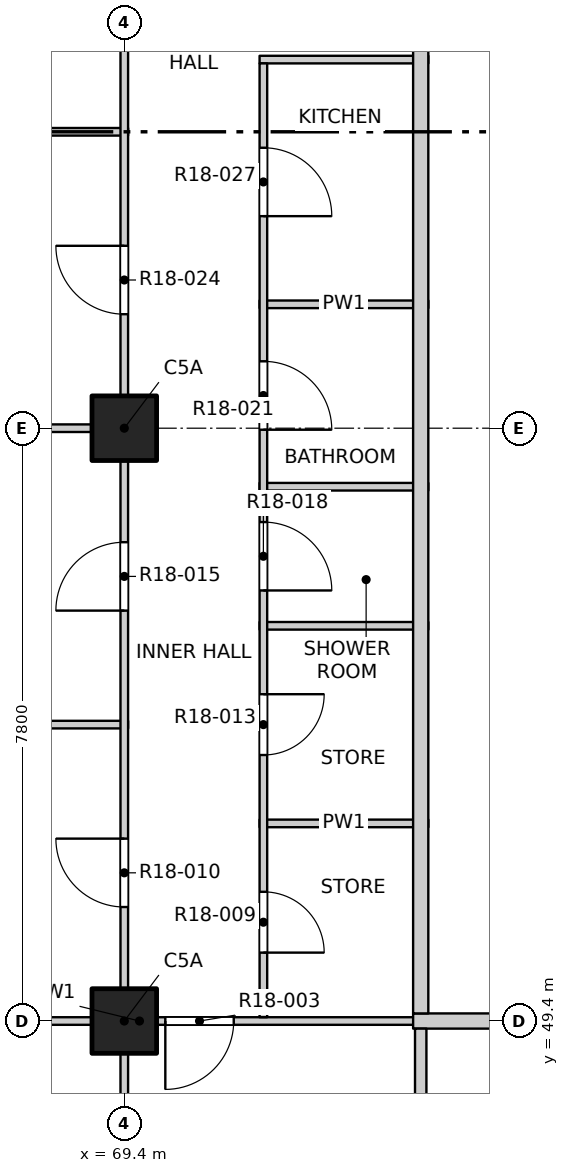
"""IFC4 building model, lengths in metres.
Left out: names, types, materials, properties, quantities, classifications, styles, units other than length and angle.
Written with IfcOpenShell. Run it as: python <this file> out.ifc"""

import sys

from ifc_helpers import new_model, si_unit, direction, frame, frame_2d, origin, origin_2d, place, context, subcontext, project, spatial, rectangle, extrude, element, fill, save


model = new_model("IFC4")
c1 = context("Model", 3, precision=1e-05, world=origin(), true_north=direction((0.0, 1.0)))
c2 = subcontext(c1, "Body", "Model", "MODEL_VIEW")
j1 = project(units=[si_unit("LENGTHUNIT", "METRE"), si_unit("PLANEANGLEUNIT", "RADIAN")], contexts=[c1])
p1 = place(None, origin())
s1 = spatial("IfcSite", under=j1, at=p1, CompositionType="ELEMENT")
p2 = place(p1, origin())
s2 = spatial("IfcBuilding", under=s1, at=p2, CompositionType="ELEMENT")
p3 = place(p2, frame((0.0, 0.0, 189.4)))
s3 = spatial("IfcBuildingStorey", under=s2, at=p3, CompositionType="ELEMENT", Elevation=189.4)
for number, where, z_axis, x_axis in (
    (1, (69.4, 49.4, -0.25), (0.0, 0.0, 1.0), (1.0, 0.0, 0.0)),
    (2, (69.4, 57.2, -0.25), (0.0, 0.0, 1.0), (1.0, 0.0, 0.0)),
):
    element("IfcColumn", number, at=place(p3, frame(where, z_axis=z_axis, x_axis=x_axis)), inside=s3, PredefinedType="COLUMN", context=c2, shape_type="SweptSolid", body=[
        extrude(rectangle(XDim=0.85, YDim=0.85, at=origin_2d()), origin(), (0.0, 0.0, 1.0), 3.35),
    ])
p4 = place(p3, frame((65.8, 49.4, 0.0), z_axis=(0.0, 0.0, 1.0), x_axis=(1.0, 0.0, 0.0)))
e3 = element("IfcWall", 3, at=p4, inside=s3, PredefinedType="PARTITIONING", context=c2, shape_type="SweptSolid", body=[
    extrude(rectangle(XDim=7.6, YDim=0.1, at=frame_2d((3.8, 0.0))), origin(), (0.0, 0.0, 1.0), 3.1),
])
p5 = place(p4, frame((4.14, 0.0, 0.0)))
e4 = element("IfcOpeningElement", 4, at=p5, cuts=e3, PredefinedType="OPENING", context=c2, shape_type="SweptSolid", body=[
    extrude(rectangle(XDim=0.9, YDim=2.1, at=frame_2d((0.45, 1.05))), frame((0.0, 0.06, 0.0), z_axis=(0.0, -1.0, 0.0), x_axis=(1.0, 0.0, 0.0)), (0.0, 0.0, 1.0), 0.12),
])
p6 = place(p3, frame((73.2, 49.4, 0.0), z_axis=(0.0, 0.0, 1.0), x_axis=(1.0, 0.0, 0.0)))
e5 = element("IfcWall", 5, at=p6, inside=s3, PredefinedType="PARTITIONING", context=c2, shape_type="SweptSolid", body=[
    extrude(rectangle(XDim=23.6, YDim=0.2, at=frame_2d((11.8, 0.0))), origin(), (0.0, 0.0, 1.0), 3.1),
])
p7 = place(p6, frame((4.525, 0.0, 0.0)))
e6 = element("IfcOpeningElement", 6, at=p7, cuts=e5, PredefinedType="OPENING", context=c2, shape_type="SweptSolid", body=[
    extrude(rectangle(XDim=1.2, YDim=2.1, at=frame_2d((0.6, 1.05))), frame((0.0, 0.11, 0.0), z_axis=(0.0, -1.0, 0.0), x_axis=(1.0, 0.0, 0.0)), (0.0, 0.0, 1.0), 0.22),
])
p8 = place(p6, frame((12.325, 0.0, 0.0)))
e7 = element("IfcOpeningElement", 7, at=p8, cuts=e5, PredefinedType="OPENING", context=c2, shape_type="SweptSolid", body=[
    extrude(rectangle(XDim=1.2, YDim=2.1, at=frame_2d((0.6, 1.05))), frame((0.0, 0.11, 0.0), z_axis=(0.0, -1.0, 0.0), x_axis=(1.0, 0.0, 0.0)), (0.0, 0.0, 1.0), 0.22),
])
p9 = place(p6, frame((20.125, 0.0, 0.0)))
e8 = element("IfcOpeningElement", 8, at=p9, cuts=e5, PredefinedType="OPENING", context=c2, shape_type="SweptSolid", body=[
    extrude(rectangle(XDim=1.2, YDim=2.1, at=frame_2d((0.6, 1.05))), frame((0.0, 0.11, 0.0), z_axis=(0.0, -1.0, 0.0), x_axis=(1.0, 0.0, 0.0)), (0.0, 0.0, 1.0), 0.22),
])
p10 = place(p3, frame((71.18, 52.0, 0.0), z_axis=(0.0, 0.0, 1.0), x_axis=(1.0, 0.0, 0.0)))
e9 = element("IfcWall", 9, at=p10, inside=s3, PredefinedType="PARTITIONING", context=c2, shape_type="SweptSolid", body=[
    extrude(rectangle(XDim=2.22, YDim=0.1, at=frame_2d((1.11, 0.0))), origin(), (0.0, 0.0, 1.0), 3.1),
])
p11 = place(p3, frame((65.8, 53.3, 0.0), z_axis=(0.0, 0.0, 1.0), x_axis=(1.0, 0.0, 0.0)))
e10 = element("IfcWall", 10, at=p11, inside=s3, PredefinedType="PARTITIONING", context=c2, shape_type="SweptSolid", body=[
    extrude(rectangle(XDim=3.65, YDim=0.1, at=frame_2d((1.825, 0.0))), origin(), (0.0, 0.0, 1.0), 3.1),
])
for number, where, z_axis, x_axis in (
    (11, (71.18, 54.6, 0.0), (0.0, 0.0, 1.0), (1.0, 0.0, 0.0)),
    (12, (71.18, 56.43, 0.0), (0.0, 0.0, 1.0), (1.0, 0.0, 0.0)),
):
    element("IfcWall", number, at=place(p3, frame(where, z_axis=z_axis, x_axis=x_axis)), inside=s3, PredefinedType="PARTITIONING", context=c2, shape_type="SweptSolid", body=[
        extrude(rectangle(XDim=2.22, YDim=0.1, at=frame_2d((1.11, 0.0))), origin(), (0.0, 0.0, 1.0), 3.1),
    ])
p12 = place(p3, frame((65.8, 57.2, 0.0), z_axis=(0.0, 0.0, 1.0), x_axis=(1.0, 0.0, 0.0)))
e13 = element("IfcWall", 13, at=p12, inside=s3, PredefinedType="PARTITIONING", context=c2, shape_type="SweptSolid", body=[
    extrude(rectangle(XDim=3.65, YDim=0.1, at=frame_2d((1.825, 0.0))), origin(), (0.0, 0.0, 1.0), 3.1),
])
p13 = place(p3, frame((71.18, 58.83, 0.0), z_axis=(0.0, 0.0, 1.0), x_axis=(1.0, 0.0, 0.0)))
e14 = element("IfcWall", 14, at=p13, inside=s3, PredefinedType="PARTITIONING", context=c2, shape_type="SweptSolid", body=[
    extrude(rectangle(XDim=2.22, YDim=0.1, at=frame_2d((1.11, 0.0))), origin(), (0.0, 0.0, 1.0), 3.1),
])
p14 = place(p3, frame((65.8, 61.1, 0.0), z_axis=(0.0, 0.0, 1.0), x_axis=(1.0, 0.0, 0.0)))
e15 = element("IfcWall", 15, at=p14, inside=s3, PredefinedType="PARTITIONING", context=c2, shape_type="SweptSolid", body=[
    extrude(rectangle(XDim=3.65, YDim=0.1, at=frame_2d((1.825, 0.0))), origin(), (0.0, 0.0, 1.0), 3.1),
])
p15 = place(p3, frame((71.18, 62.05, 0.0), z_axis=(0.0, 0.0, 1.0), x_axis=(1.0, 0.0, 0.0)))
e16 = element("IfcWall", 16, at=p15, inside=s3, PredefinedType="PARTITIONING", context=c2, shape_type="SweptSolid", body=[
    extrude(rectangle(XDim=2.22, YDim=0.1, at=frame_2d((1.11, 0.0))), origin(), (0.0, 0.0, 1.0), 3.1),
])
p16 = place(p3, frame((69.4, 45.8, 0.0), z_axis=(0.0, 0.0, 1.0), x_axis=(0.0, 1.0, 0.0)))
e17 = element("IfcWall", 17, at=p16, inside=s3, PredefinedType="PARTITIONING", context=c2, shape_type="SweptSolid", body=[
    extrude(rectangle(XDim=38.4, YDim=0.1, at=frame_2d((19.2, 0.0))), origin(), (0.0, 0.0, 1.0), 3.1),
])
p17 = place(p16, frame((1.05, 0.0, 0.0)))
e18 = element("IfcOpeningElement", 18, at=p17, cuts=e17, PredefinedType="OPENING", context=c2, shape_type="SweptSolid", body=[
    extrude(rectangle(XDim=1.2, YDim=2.1, at=frame_2d((0.6, 1.05))), frame((0.0, 0.06, 0.0), z_axis=(0.0, -1.0, 0.0), x_axis=(1.0, 0.0, 0.0)), (0.0, 0.0, 1.0), 0.12),
])
p18 = place(p16, frame((5.1, 0.0, 0.0)))
e19 = element("IfcOpeningElement", 19, at=p18, cuts=e17, PredefinedType="OPENING", context=c2, shape_type="SweptSolid", body=[
    extrude(rectangle(XDim=0.9, YDim=2.1, at=frame_2d((0.45, 1.05))), frame((0.0, 0.06, 0.0), z_axis=(0.0, -1.0, 0.0), x_axis=(1.0, 0.0, 0.0)), (0.0, 0.0, 1.0), 0.12),
])
p19 = place(p16, frame((9.0, 0.0, 0.0)))
e20 = element("IfcOpeningElement", 20, at=p19, cuts=e17, PredefinedType="OPENING", context=c2, shape_type="SweptSolid", body=[
    extrude(rectangle(XDim=0.9, YDim=2.1, at=frame_2d((0.45, 1.05))), frame((0.0, 0.06, 0.0), z_axis=(0.0, -1.0, 0.0), x_axis=(1.0, 0.0, 0.0)), (0.0, 0.0, 1.0), 0.12),
])
p20 = place(p16, frame((12.9, 0.0, 0.0)))
e21 = element("IfcOpeningElement", 21, at=p20, cuts=e17, PredefinedType="OPENING", context=c2, shape_type="SweptSolid", body=[
    extrude(rectangle(XDim=0.9, YDim=2.1, at=frame_2d((0.45, 1.05))), frame((0.0, 0.06, 0.0), z_axis=(0.0, -1.0, 0.0), x_axis=(1.0, 0.0, 0.0)), (0.0, 0.0, 1.0), 0.12),
])
p21 = place(p16, frame((16.8, 0.0, 0.0)))
e22 = element("IfcOpeningElement", 22, at=p21, cuts=e17, PredefinedType="OPENING", context=c2, shape_type="SweptSolid", body=[
    extrude(rectangle(XDim=0.9, YDim=2.1, at=frame_2d((0.45, 1.05))), frame((0.0, 0.06, 0.0), z_axis=(0.0, -1.0, 0.0), x_axis=(1.0, 0.0, 0.0)), (0.0, 0.0, 1.0), 0.12),
])
p22 = place(p16, frame((20.7, 0.0, 0.0)))
e23 = element("IfcOpeningElement", 23, at=p22, cuts=e17, PredefinedType="OPENING", context=c2, shape_type="SweptSolid", body=[
    extrude(rectangle(XDim=0.9, YDim=2.1, at=frame_2d((0.45, 1.05))), frame((0.0, 0.06, 0.0), z_axis=(0.0, -1.0, 0.0), x_axis=(1.0, 0.0, 0.0)), (0.0, 0.0, 1.0), 0.12),
])
p23 = place(p16, frame((24.6, 0.0, 0.0)))
e24 = element("IfcOpeningElement", 24, at=p23, cuts=e17, PredefinedType="OPENING", context=c2, shape_type="SweptSolid", body=[
    extrude(rectangle(XDim=0.9, YDim=2.1, at=frame_2d((0.45, 1.05))), frame((0.0, 0.06, 0.0), z_axis=(0.0, -1.0, 0.0), x_axis=(1.0, 0.0, 0.0)), (0.0, 0.0, 1.0), 0.12),
])
p24 = place(p16, frame((28.5, 0.0, 0.0)))
e25 = element("IfcOpeningElement", 25, at=p24, cuts=e17, PredefinedType="OPENING", context=c2, shape_type="SweptSolid", body=[
    extrude(rectangle(XDim=0.9, YDim=2.1, at=frame_2d((0.45, 1.05))), frame((0.0, 0.06, 0.0), z_axis=(0.0, -1.0, 0.0), x_axis=(1.0, 0.0, 0.0)), (0.0, 0.0, 1.0), 0.12),
])
p25 = place(p16, frame((32.4, 0.0, 0.0)))
e26 = element("IfcOpeningElement", 26, at=p25, cuts=e17, PredefinedType="OPENING", context=c2, shape_type="SweptSolid", body=[
    extrude(rectangle(XDim=0.9, YDim=2.1, at=frame_2d((0.45, 1.05))), frame((0.0, 0.06, 0.0), z_axis=(0.0, -1.0, 0.0), x_axis=(1.0, 0.0, 0.0)), (0.0, 0.0, 1.0), 0.12),
])
p26 = place(p16, frame((36.15, 0.0, 0.0)))
e27 = element("IfcOpeningElement", 27, at=p26, cuts=e17, PredefinedType="OPENING", context=c2, shape_type="SweptSolid", body=[
    extrude(rectangle(XDim=1.2, YDim=2.1, at=frame_2d((0.6, 1.05))), frame((0.0, 0.06, 0.0), z_axis=(0.0, -1.0, 0.0), x_axis=(1.0, 0.0, 0.0)), (0.0, 0.0, 1.0), 0.12),
])
p27 = place(p3, frame((71.23, 49.45, 0.0), z_axis=(0.0, 0.0, 1.0), x_axis=(0.0, 1.0, 0.0)))
e28 = element("IfcWall", 28, at=p27, inside=s3, PredefinedType="PARTITIONING", context=c2, shape_type="SweptSolid", body=[
    extrude(rectangle(XDim=12.55, YDim=0.1, at=frame_2d((6.275, 0.0))), origin(), (0.0, 0.0, 1.0), 3.1),
])
p28 = place(p27, frame((0.85, 0.0, 0.0)))
e29 = element("IfcOpeningElement", 29, at=p28, cuts=e28, PredefinedType="OPENING", context=c2, shape_type="SweptSolid", body=[
    extrude(rectangle(XDim=0.8, YDim=2.1, at=frame_2d((0.4, 1.05))), frame((0.0, 0.06, 0.0), z_axis=(0.0, -1.0, 0.0), x_axis=(1.0, 0.0, 0.0)), (0.0, 0.0, 1.0), 0.12),
])
p29 = place(p27, frame((3.45, 0.0, 0.0)))
e30 = element("IfcOpeningElement", 30, at=p29, cuts=e28, PredefinedType="OPENING", context=c2, shape_type="SweptSolid", body=[
    extrude(rectangle(XDim=0.8, YDim=2.1, at=frame_2d((0.4, 1.05))), frame((0.0, 0.06, 0.0), z_axis=(0.0, -1.0, 0.0), x_axis=(1.0, 0.0, 0.0)), (0.0, 0.0, 1.0), 0.12),
])
p30 = place(p27, frame((5.615, 0.0, 0.0)))
e31 = element("IfcOpeningElement", 31, at=p30, cuts=e28, PredefinedType="OPENING", context=c2, shape_type="SweptSolid", body=[
    extrude(rectangle(XDim=0.9, YDim=2.1, at=frame_2d((0.45, 1.05))), frame((0.0, 0.06, 0.0), z_axis=(0.0, -1.0, 0.0), x_axis=(1.0, 0.0, 0.0)), (0.0, 0.0, 1.0), 0.12),
])
p31 = place(p27, frame((7.73, 0.0, 0.0)))
e32 = element("IfcOpeningElement", 32, at=p31, cuts=e28, PredefinedType="OPENING", context=c2, shape_type="SweptSolid", body=[
    extrude(rectangle(XDim=0.9, YDim=2.1, at=frame_2d((0.45, 1.05))), frame((0.0, 0.06, 0.0), z_axis=(0.0, -1.0, 0.0), x_axis=(1.0, 0.0, 0.0)), (0.0, 0.0, 1.0), 0.12),
])
p32 = place(p27, frame((10.54, 0.0, 0.0)))
e33 = element("IfcOpeningElement", 33, at=p32, cuts=e28, PredefinedType="OPENING", context=c2, shape_type="SweptSolid", body=[
    extrude(rectangle(XDim=0.9, YDim=2.1, at=frame_2d((0.45, 1.05))), frame((0.0, 0.06, 0.0), z_axis=(0.0, -1.0, 0.0), x_axis=(1.0, 0.0, 0.0)), (0.0, 0.0, 1.0), 0.12),
])
p33 = place(p3, frame((73.3, 45.8, 0.0), z_axis=(0.0, 0.0, 1.0), x_axis=(0.0, 1.0, 0.0)))
e34 = element("IfcWall", 34, at=p33, inside=s3, PredefinedType="PARTITIONING", context=c2, shape_type="SweptSolid", body=[
    extrude(rectangle(XDim=3.5, YDim=0.15, at=frame_2d((1.75, 0.0))), origin(), (0.0, 0.0, 1.0), 3.1),
])
p34 = place(p3, frame((73.3, 49.5, 0.0), z_axis=(0.0, 0.0, 1.0), x_axis=(0.0, 1.0, 0.0)))
e35 = element("IfcWall", 35, at=p34, inside=s3, PredefinedType="PARTITIONING", context=c2, shape_type="SweptSolid", body=[
    extrude(rectangle(XDim=34.7, YDim=0.2, at=frame_2d((17.35, 0.0))), origin(), (0.0, 0.0, 1.0), 3.1),
])
p35 = place(p34, frame((13.825, 0.0, 0.0)))
e36 = element("IfcOpeningElement", 36, at=p35, cuts=e35, PredefinedType="OPENING", context=c2, shape_type="SweptSolid", body=[
    extrude(rectangle(XDim=1.0, YDim=2.1, at=frame_2d((0.5, 1.05))), frame((0.0, 0.11, 0.0), z_axis=(0.0, -1.0, 0.0), x_axis=(1.0, 0.0, 0.0)), (0.0, 0.0, 1.0), 0.22),
])
p36 = place(p34, frame((21.975, 0.0, 0.0)))
e37 = element("IfcOpeningElement", 37, at=p36, cuts=e35, PredefinedType="OPENING", context=c2, shape_type="SweptSolid", body=[
    extrude(rectangle(XDim=1.0, YDim=2.1, at=frame_2d((0.5, 1.05))), frame((0.0, 0.11, 0.0), z_axis=(0.0, -1.0, 0.0), x_axis=(1.0, 0.0, 0.0)), (0.0, 0.0, 1.0), 0.22),
])
p37 = place(p5, origin())
e38 = element("IfcDoor", 38, at=p37, inside=s3, OperationType="SINGLE_SWING_RIGHT", PredefinedType="DOOR", context=c2, shape_type="SweptSolid", body=[
    extrude(rectangle(XDim=0.9, YDim=2.1, at=frame_2d((0.45, 1.05))), frame((0.0, 0.025, 0.0), z_axis=(0.0, -1.0, 0.0), x_axis=(1.0, 0.0, 0.0)), (0.0, 0.0, 1.0), 0.05),
])
fill(e4, e38)
p38 = place(p28, origin())
e39 = element("IfcDoor", 39, at=p38, inside=s3, OperationType="SINGLE_SWING_RIGHT", PredefinedType="DOOR", context=c2, shape_type="SweptSolid", body=[
    extrude(rectangle(XDim=0.8, YDim=2.1, at=frame_2d((0.4, 1.05))), frame((0.0, 0.025, 0.0), z_axis=(0.0, -1.0, 0.0), x_axis=(1.0, 0.0, 0.0)), (0.0, 0.0, 1.0), 0.05),
])
fill(e29, e39)
p39 = place(p18, origin())
e40 = element("IfcDoor", 40, at=p39, inside=s3, OperationType="SINGLE_SWING_RIGHT", PredefinedType="DOOR", context=c2, shape_type="SweptSolid", body=[
    extrude(rectangle(XDim=0.9, YDim=2.1, at=frame_2d((0.45, 1.05))), frame((0.0, 0.025, 0.0), z_axis=(0.0, -1.0, 0.0), x_axis=(1.0, 0.0, 0.0)), (0.0, 0.0, 1.0), 0.05),
])
fill(e19, e40)
p40 = place(p29, origin())
e41 = element("IfcDoor", 41, at=p40, inside=s3, OperationType="SINGLE_SWING_LEFT", PredefinedType="DOOR", context=c2, shape_type="SweptSolid", body=[
    extrude(rectangle(XDim=0.8, YDim=2.1, at=frame_2d((0.4, 1.05))), frame((0.0, 0.025, 0.0), z_axis=(0.0, -1.0, 0.0), x_axis=(1.0, 0.0, 0.0)), (0.0, 0.0, 1.0), 0.05),
])
fill(e30, e41)
p41 = place(p19, origin())
e42 = element("IfcDoor", 42, at=p41, inside=s3, OperationType="SINGLE_SWING_LEFT", PredefinedType="DOOR", context=c2, shape_type="SweptSolid", body=[
    extrude(rectangle(XDim=0.9, YDim=2.1, at=frame_2d((0.45, 1.05))), frame((0.0, 0.025, 0.0), z_axis=(0.0, -1.0, 0.0), x_axis=(1.0, 0.0, 0.0)), (0.0, 0.0, 1.0), 0.05),
])
fill(e20, e42)
p42 = place(p30, origin())
e43 = element("IfcDoor", 43, at=p42, inside=s3, OperationType="SINGLE_SWING_RIGHT", PredefinedType="DOOR", context=c2, shape_type="SweptSolid", body=[
    extrude(rectangle(XDim=0.9, YDim=2.1, at=frame_2d((0.45, 1.05))), frame((0.0, 0.025, 0.0), z_axis=(0.0, -1.0, 0.0), x_axis=(1.0, 0.0, 0.0)), (0.0, 0.0, 1.0), 0.05),
])
fill(e31, e43)
p43 = place(p31, origin())
e44 = element("IfcDoor", 44, at=p43, inside=s3, OperationType="SINGLE_SWING_RIGHT", PredefinedType="DOOR", context=c2, shape_type="SweptSolid", body=[
    extrude(rectangle(XDim=0.9, YDim=2.1, at=frame_2d((0.45, 1.05))), frame((0.0, 0.025, 0.0), z_axis=(0.0, -1.0, 0.0), x_axis=(1.0, 0.0, 0.0)), (0.0, 0.0, 1.0), 0.05),
])
fill(e32, e44)
p44 = place(p20, origin())
e45 = element("IfcDoor", 45, at=p44, inside=s3, OperationType="SINGLE_SWING_RIGHT", PredefinedType="DOOR", context=c2, shape_type="SweptSolid", body=[
    extrude(rectangle(XDim=0.9, YDim=2.1, at=frame_2d((0.45, 1.05))), frame((0.0, 0.025, 0.0), z_axis=(0.0, -1.0, 0.0), x_axis=(1.0, 0.0, 0.0)), (0.0, 0.0, 1.0), 0.05),
])
fill(e21, e45)
p45 = place(p32, origin())
e46 = element("IfcDoor", 46, at=p45, inside=s3, OperationType="SINGLE_SWING_RIGHT", PredefinedType="DOOR", context=c2, shape_type="SweptSolid", body=[
    extrude(rectangle(XDim=0.9, YDim=2.1, at=frame_2d((0.45, 1.05))), frame((0.0, 0.025, 0.0), z_axis=(0.0, -1.0, 0.0), x_axis=(1.0, 0.0, 0.0)), (0.0, 0.0, 1.0), 0.05),
])
fill(e33, e46)
save(model, sys.argv[1])
